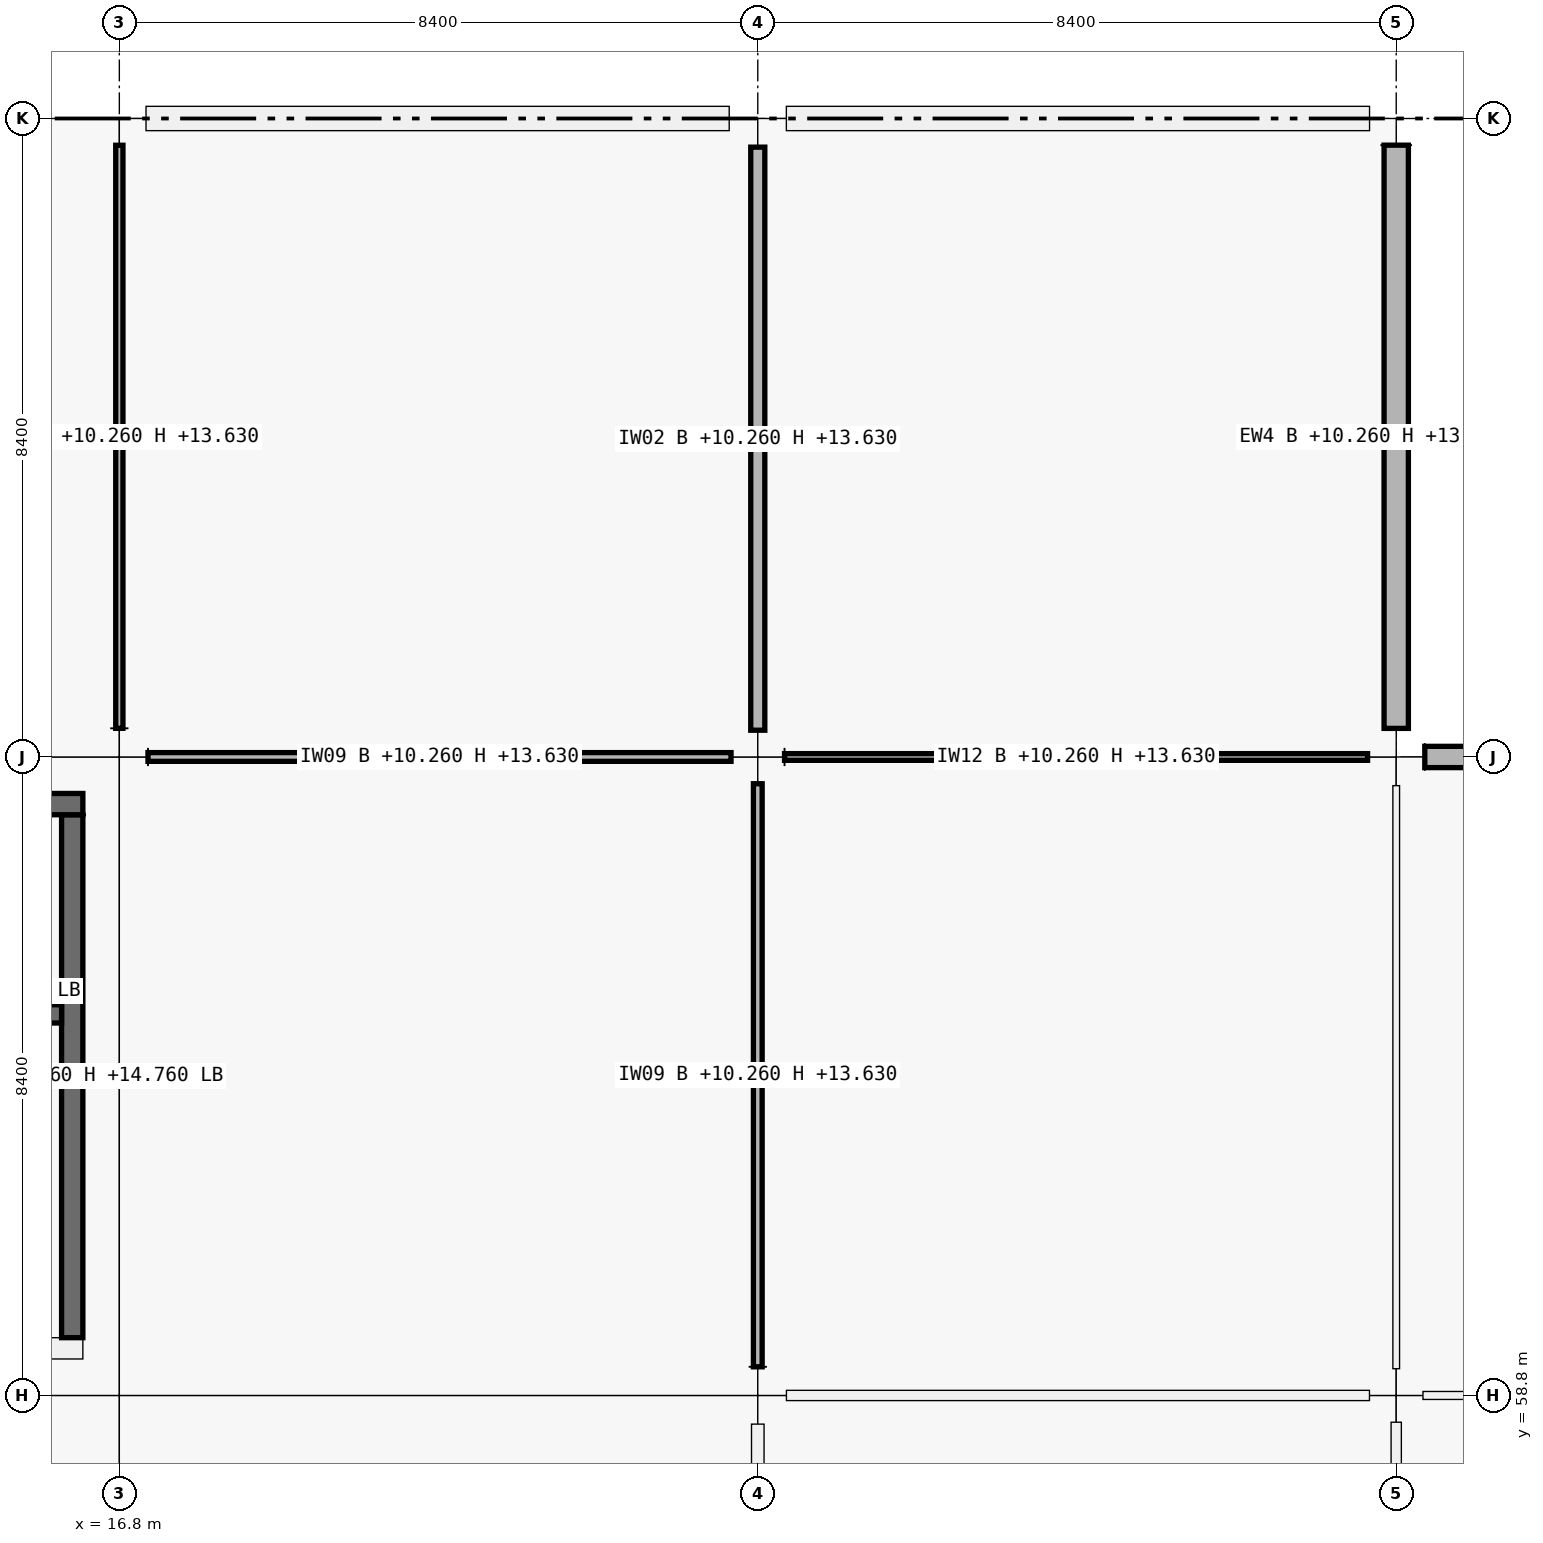
"""IFC4 building model, lengths in metres.
Left out: names, types, materials, properties, quantities, classifications, styles, units other than length and angle.
Written with IfcOpenShell. Run it as: python <this file> out.ifc"""

import sys

from ifc_helpers import new_model, si_unit, direction, frame, frame_2d, origin, origin_2d, place, context, subcontext, project, spatial, rectangle, extrude, element, fill, save


model = new_model("IFC4")
c1 = context("Model", 3, precision=1e-05, world=origin(), true_north=direction((0.0, 1.0)))
c2 = subcontext(c1, "Body", "Model", "MODEL_VIEW")
j1 = project(units=[si_unit("LENGTHUNIT", "METRE"), si_unit("PLANEANGLEUNIT", "RADIAN")], contexts=[c1])
p1 = place(None, origin())
s1 = spatial("IfcSite", under=j1, at=p1, CompositionType="ELEMENT")
p2 = place(p1, origin())
s2 = spatial("IfcBuilding", under=s1, at=p2, CompositionType="ELEMENT")
p3 = place(p2, frame((0.0, 0.0, 10.26)))
s3 = spatial("IfcBuildingStorey", under=s2, at=p3, CompositionType="ELEMENT", Elevation=10.26)
p4 = place(p3, frame((16.8, 58.8, 0.0), z_axis=(0.0, 0.0, 1.0), x_axis=(1.0, 0.0, 0.0)))
e1 = element("IfcColumn", 1, at=p4, inside=s3, PredefinedType="COLUMN", context=c2, shape_type="SweptSolid", body=[
    extrude(rectangle(XDim=0.7, YDim=0.7, at=origin_2d()), origin(), (0.0, 0.0, 1.0), 4.5),
])
p5 = place(p3, frame((16.8, 67.2, 0.0), z_axis=(0.0, 0.0, 1.0), x_axis=(1.0, 0.0, 0.0)))
e2 = element("IfcColumn", 2, at=p5, inside=s3, PredefinedType="COLUMN", context=c2, shape_type="SweptSolid", body=[
    extrude(rectangle(XDim=0.75, YDim=0.75, at=origin_2d()), origin(), (0.0, 0.0, 1.0), 4.5),
])
p6 = place(p3, frame((16.8, 75.6, 0.0), z_axis=(0.0, 0.0, 1.0), x_axis=(1.0, 0.0, 0.0)))
e3 = element("IfcColumn", 3, at=p6, inside=s3, PredefinedType="COLUMN", context=c2, shape_type="SweptSolid", body=[
    extrude(rectangle(XDim=0.7, YDim=0.7, at=origin_2d()), origin(), (0.0, 0.0, 1.0), 4.5),
])
p7 = place(p3, frame((25.2, 58.8, 0.0), z_axis=(0.0, 0.0, 1.0), x_axis=(1.0, 0.0, 0.0)))
e4 = element("IfcColumn", 4, at=p7, inside=s3, PredefinedType="COLUMN", context=c2, shape_type="SweptSolid", body=[
    extrude(rectangle(XDim=0.75, YDim=0.75, at=origin_2d()), origin(), (0.0, 0.0, 1.0), 4.5),
])
p8 = place(p3, frame((25.2, 67.2, 0.0), z_axis=(0.0, 0.0, 1.0), x_axis=(1.0, 0.0, 0.0)))
e5 = element("IfcColumn", 5, at=p8, inside=s3, PredefinedType="COLUMN", context=c2, shape_type="SweptSolid", body=[
    extrude(rectangle(XDim=0.7, YDim=0.7, at=origin_2d()), origin(), (0.0, 0.0, 1.0), 4.5),
])
p9 = place(p3, frame((25.2, 75.6, 0.0), z_axis=(0.0, 0.0, 1.0), x_axis=(1.0, 0.0, 0.0)))
e6 = element("IfcColumn", 6, at=p9, inside=s3, PredefinedType="COLUMN", context=c2, shape_type="SweptSolid", body=[
    extrude(rectangle(XDim=0.75, YDim=0.75, at=origin_2d()), origin(), (0.0, 0.0, 1.0), 4.5),
])
p10 = place(p3, frame((33.6, 58.8, 0.0), z_axis=(0.0, 0.0, 1.0), x_axis=(1.0, 0.0, 0.0)))
e7 = element("IfcColumn", 7, at=p10, inside=s3, PredefinedType="COLUMN", context=c2, shape_type="SweptSolid", body=[
    extrude(rectangle(XDim=0.7, YDim=0.7, at=origin_2d()), origin(), (0.0, 0.0, 1.0), 4.5),
])
p11 = place(p3, frame((33.6, 67.2, 0.0), z_axis=(0.0, 0.0, 1.0), x_axis=(1.0, 0.0, 0.0)))
e8 = element("IfcColumn", 8, at=p11, inside=s3, PredefinedType="COLUMN", context=c2, shape_type="SweptSolid", body=[
    extrude(rectangle(XDim=0.75, YDim=0.75, at=origin_2d()), origin(), (0.0, 0.0, 1.0), 4.5),
])
p12 = place(p3, frame((33.6, 75.6, 0.0), z_axis=(0.0, 0.0, 1.0), x_axis=(1.0, 0.0, 0.0)))
e9 = element("IfcColumn", 9, at=p12, inside=s3, PredefinedType="COLUMN", context=c2, shape_type="SweptSolid", body=[
    extrude(rectangle(XDim=0.7, YDim=0.7, at=origin_2d()), origin(), (0.0, 0.0, 1.0), 4.5),
])
p13 = place(p3, frame((17.151, 75.6, 0.0), z_axis=(0.0, 0.0, 1.0), x_axis=(1.0, 0.0, 0.0)))
e10 = element("IfcWall", 10, at=p13, inside=s3, PredefinedType="SOLIDWALL", context=c2, shape_type="SweptSolid", body=[
    extrude(rectangle(XDim=7.673, YDim=0.32, at=frame_2d((3.836, 0.0))), origin(), (0.0, 0.0, 1.0), 3.54),
])
p14 = place(p13, frame((2.636, 0.0, 0.9)))
e11 = element("IfcOpeningElement", 11, at=p14, cuts=e10, PredefinedType="OPENING", context=c2, shape_type="SweptSolid", body=[
    extrude(rectangle(XDim=2.4, YDim=1.8, at=frame_2d((1.2, 0.9))), frame((0.0, 0.16, 0.0), z_axis=(0.0, -1.0, 0.0), x_axis=(1.0, 0.0, 0.0)), (0.0, 0.0, 1.0), 0.32),
])
p15 = place(p3, frame((25.576, 75.6, 0.0), z_axis=(0.0, 0.0, 1.0), x_axis=(1.0, 0.0, 0.0)))
e12 = element("IfcWall", 12, at=p15, inside=s3, PredefinedType="SOLIDWALL", context=c2, shape_type="SweptSolid", body=[
    extrude(rectangle(XDim=7.673, YDim=0.32, at=frame_2d((3.836, 0.0))), origin(), (0.0, 0.0, 1.0), 3.54),
])
p16 = place(p15, frame((2.337, 0.0, 0.9)))
e13 = element("IfcOpeningElement", 13, at=p16, cuts=e12, PredefinedType="OPENING", context=c2, shape_type="SweptSolid", body=[
    extrude(rectangle(XDim=3.0, YDim=1.2, at=frame_2d((1.5, 0.6))), frame((0.0, 0.16, 0.0), z_axis=(0.0, -1.0, 0.0), x_axis=(1.0, 0.0, 0.0)), (0.0, 0.0, 1.0), 0.32),
])
p17 = place(p3, frame((33.6, 75.249, 0.0), z_axis=(0.0, 0.0, 1.0), x_axis=(0.0, -1.0, 0.0)))
e14 = element("IfcWall", 14, at=p17, inside=s3, PredefinedType="SOLIDWALL", context=c2, shape_type="SweptSolid", body=[
    extrude(rectangle(XDim=7.673, YDim=0.32, at=frame_2d((3.836, 0.0))), origin(), (0.0, 0.0, 1.0), 3.54),
])
p18 = place(p17, frame((2.486, 0.0, 0.9)))
e15 = element("IfcOpeningElement", 15, at=p18, cuts=e14, PredefinedType="OPENING", context=c2, shape_type="SweptSolid", body=[
    extrude(rectangle(XDim=2.7, YDim=1.2, at=frame_2d((1.35, 0.6))), frame((0.0, 0.16, 0.0), z_axis=(0.0, -1.0, 0.0), x_axis=(1.0, 0.0, 0.0)), (0.0, 0.0, 1.0), 0.32),
])
p19 = place(p3, frame((33.976, 67.2, 0.0), z_axis=(0.0, 0.0, 1.0), x_axis=(1.0, 0.0, 0.0)))
e16 = element("IfcWall", 16, at=p19, inside=s3, PredefinedType="SOLIDWALL", context=c2, shape_type="SweptSolid", body=[
    extrude(rectangle(XDim=7.673, YDim=0.28, at=frame_2d((3.836, 0.0))), origin(), (0.0, 0.0, 1.0), 3.54),
])
p20 = place(p19, frame((2.937, 0.0, 0.9)))
e17 = element("IfcOpeningElement", 17, at=p20, cuts=e16, PredefinedType="OPENING", context=c2, shape_type="SweptSolid", body=[
    extrude(rectangle(XDim=1.8, YDim=1.35, at=frame_2d((0.9, 0.675))), frame((0.0, 0.14, 0.0), z_axis=(0.0, -1.0, 0.0), x_axis=(1.0, 0.0, 0.0)), (0.0, 0.0, 1.0), 0.28),
])
p21 = place(p3, frame((16.32, 59.42, 0.0), z_axis=(0.0, 0.0, 1.0), x_axis=(-1.0, 0.0, 0.0)))
e18 = element("IfcWall", 18, at=p21, inside=s3, PredefinedType="SHEAR", context=c2, shape_type="SweptSolid", body=[
    extrude(rectangle(XDim=7.44, YDim=0.28, at=frame_2d((3.72, 0.0))), origin(), (0.0, 0.0, 1.0), 4.5),
])
p22 = place(p21, frame((1.28, 0.0, 0.0)))
e19 = element("IfcOpeningElement", 19, at=p22, cuts=e18, PredefinedType="OPENING", context=c2, shape_type="SweptSolid", body=[
    extrude(rectangle(XDim=1.5, YDim=2.15, at=frame_2d((0.75, 1.075))), frame((0.0, 0.14, 0.0), z_axis=(0.0, -1.0, 0.0), x_axis=(1.0, 0.0, 0.0)), (0.0, 0.0, 1.0), 0.28),
])
p23 = place(p3, frame((8.88, 66.58, 0.0), z_axis=(0.0, 0.0, 1.0), x_axis=(1.0, 0.0, 0.0)))
e20 = element("IfcWall", 20, at=p23, inside=s3, PredefinedType="SHEAR", context=c2, shape_type="SweptSolid", body=[
    extrude(rectangle(XDim=7.44, YDim=0.28, at=frame_2d((3.72, 0.0))), origin(), (0.0, 0.0, 1.0), 4.5),
])
p24 = place(p3, frame((16.18, 66.44, 0.0), z_axis=(0.0, 0.0, 1.0), x_axis=(0.0, -1.0, 0.0)))
e21 = element("IfcWall", 21, at=p24, inside=s3, PredefinedType="SHEAR", context=c2, shape_type="SweptSolid", body=[
    extrude(rectangle(XDim=6.88, YDim=0.28, at=frame_2d((3.44, 0.0))), origin(), (0.0, 0.0, 1.0), 4.5),
])
p25 = place(p3, frame((12.56, 63.82, 0.0), z_axis=(0.0, 0.0, 1.0), x_axis=(1.0, 0.0, 0.0)))
e22 = element("IfcWall", 22, at=p25, inside=s3, PredefinedType="SHEAR", context=c2, shape_type="SweptSolid", body=[
    extrude(rectangle(XDim=3.48, YDim=0.24, at=frame_2d((1.74, 0.0))), origin(), (0.0, 0.0, 1.0), 4.5),
])
p26 = place(p25, frame((1.19, 0.0, 0.0)))
e23 = element("IfcOpeningElement", 23, at=p26, cuts=e22, PredefinedType="OPENING", context=c2, shape_type="SweptSolid", body=[
    extrude(rectangle(XDim=1.1, YDim=2.15, at=frame_2d((0.55, 1.075))), frame((0.0, 0.12, 0.0), z_axis=(0.0, -1.0, 0.0), x_axis=(1.0, 0.0, 0.0)), (0.0, 0.0, 1.0), 0.24),
])
p27 = place(p3, frame((17.177, 67.2, 0.0), z_axis=(0.0, 0.0, 1.0), x_axis=(1.0, 0.0, 0.0)))
e24 = element("IfcWall", 24, at=p27, inside=s3, PredefinedType="PARTITIONING", context=c2, shape_type="SweptSolid", body=[
    extrude(rectangle(XDim=7.671, YDim=0.115, at=frame_2d((3.835, 0.0))), origin(), (0.0, 0.0, 1.0), 3.37),
])
p28 = place(p27, frame((3.316, 0.0, 0.0)))
e25 = element("IfcOpeningElement", 25, at=p28, cuts=e24, PredefinedType="OPENING", context=c2, shape_type="SweptSolid", body=[
    extrude(rectangle(XDim=1.04, YDim=2.2, at=frame_2d((0.52, 1.1))), frame((0.0, 0.058, 0.0), z_axis=(0.0, -1.0, 0.0), x_axis=(1.0, 0.0, 0.0)), (0.0, 0.0, 1.0), 0.115),
])
p29 = place(p3, frame((25.577, 58.8, 0.0), z_axis=(0.0, 0.0, 1.0), x_axis=(1.0, 0.0, 0.0)))
e26 = element("IfcWall", 26, at=p29, inside=s3, PredefinedType="PARTITIONING", context=c2, shape_type="SweptSolid", body=[
    extrude(rectangle(XDim=7.671, YDim=0.135, at=frame_2d((3.835, 0.0))), origin(), (0.0, 0.0, 1.0), 3.37),
])
p30 = place(p29, frame((3.306, 0.0, 0.0)))
e27 = element("IfcOpeningElement", 27, at=p30, cuts=e26, PredefinedType="OPENING", context=c2, shape_type="SweptSolid", body=[
    extrude(rectangle(XDim=1.06, YDim=2.25, at=frame_2d((0.53, 1.125))), frame((0.0, 0.067, 0.0), z_axis=(0.0, -1.0, 0.0), x_axis=(1.0, 0.0, 0.0)), (0.0, 0.0, 1.0), 0.135),
])
p31 = place(p3, frame((25.552, 67.2, 0.0), z_axis=(0.0, 0.0, 1.0), x_axis=(1.0, 0.0, 0.0)))
e28 = element("IfcWall", 28, at=p31, inside=s3, PredefinedType="PARTITIONING", context=c2, shape_type="SweptSolid", body=[
    extrude(rectangle(XDim=7.671, YDim=0.088, at=frame_2d((3.835, 0.0))), origin(), (0.0, 0.0, 1.0), 3.37),
])
p32 = place(p31, frame((3.316, 0.0, 0.0)))
e29 = element("IfcOpeningElement", 29, at=p32, cuts=e28, PredefinedType="OPENING", context=c2, shape_type="SweptSolid", body=[
    extrude(rectangle(XDim=1.04, YDim=2.2, at=frame_2d((0.52, 1.1))), frame((0.0, 0.044, 0.0), z_axis=(0.0, -1.0, 0.0), x_axis=(1.0, 0.0, 0.0)), (0.0, 0.0, 1.0), 0.088),
])
p33 = place(p3, frame((33.952, 58.8, 0.0), z_axis=(0.0, 0.0, 1.0), x_axis=(1.0, 0.0, 0.0)))
e30 = element("IfcWall", 30, at=p33, inside=s3, PredefinedType="PARTITIONING", context=c2, shape_type="SweptSolid", body=[
    extrude(rectangle(XDim=7.721, YDim=0.105, at=frame_2d((3.861, 0.0))), origin(), (0.0, 0.0, 1.0), 3.37),
])
p34 = place(p33, frame((3.351, 0.0, 0.0)))
e31 = element("IfcOpeningElement", 31, at=p34, cuts=e30, PredefinedType="OPENING", context=c2, shape_type="SweptSolid", body=[
    extrude(rectangle(XDim=1.02, YDim=2.2, at=frame_2d((0.51, 1.1))), frame((0.0, 0.052, 0.0), z_axis=(0.0, -1.0, 0.0), x_axis=(1.0, 0.0, 0.0)), (0.0, 0.0, 1.0), 0.105),
])
p35 = place(p3, frame((16.8, 67.577, 0.0), z_axis=(0.0, 0.0, 1.0), x_axis=(0.0, 1.0, 0.0)))
e32 = element("IfcWall", 32, at=p35, inside=s3, PredefinedType="PARTITIONING", context=c2, shape_type="SweptSolid", body=[
    extrude(rectangle(XDim=7.671, YDim=0.095, at=frame_2d((3.835, 0.0))), origin(), (0.0, 0.0, 1.0), 3.37),
])
p36 = place(p35, frame((3.311, 0.0, 0.0)))
e33 = element("IfcOpeningElement", 33, at=p36, cuts=e32, PredefinedType="OPENING", context=c2, shape_type="SweptSolid", body=[
    extrude(rectangle(XDim=1.05, YDim=2.12, at=frame_2d((0.525, 1.06))), frame((0.0, 0.047, 0.0), z_axis=(0.0, -1.0, 0.0), x_axis=(1.0, 0.0, 0.0)), (0.0, 0.0, 1.0), 0.095),
])
p37 = place(p3, frame((25.2, 50.752, 0.0), z_axis=(0.0, 0.0, 1.0), x_axis=(0.0, 1.0, 0.0)))
e34 = element("IfcWall", 34, at=p37, inside=s3, PredefinedType="PARTITIONING", context=c2, shape_type="SweptSolid", body=[
    extrude(rectangle(XDim=7.671, YDim=0.165, at=frame_2d((3.835, 0.0))), origin(), (0.0, 0.0, 1.0), 3.37),
])
p38 = place(p37, frame((3.306, 0.0, 0.0)))
e35 = element("IfcOpeningElement", 35, at=p38, cuts=e34, PredefinedType="OPENING", context=c2, shape_type="SweptSolid", body=[
    extrude(rectangle(XDim=1.06, YDim=2.25, at=frame_2d((0.53, 1.125))), frame((0.0, 0.083, 0.0), z_axis=(0.0, -1.0, 0.0), x_axis=(1.0, 0.0, 0.0)), (0.0, 0.0, 1.0), 0.165),
])
p39 = place(p3, frame((25.2, 59.177, 0.0), z_axis=(0.0, 0.0, 1.0), x_axis=(0.0, 1.0, 0.0)))
e36 = element("IfcWall", 36, at=p39, inside=s3, PredefinedType="PARTITIONING", context=c2, shape_type="SweptSolid", body=[
    extrude(rectangle(XDim=7.671, YDim=0.115, at=frame_2d((3.835, 0.0))), origin(), (0.0, 0.0, 1.0), 3.37),
])
p40 = place(p39, frame((3.316, 0.0, 0.0)))
e37 = element("IfcOpeningElement", 37, at=p40, cuts=e36, PredefinedType="OPENING", context=c2, shape_type="SweptSolid", body=[
    extrude(rectangle(XDim=1.04, YDim=2.2, at=frame_2d((0.52, 1.1))), frame((0.0, 0.058, 0.0), z_axis=(0.0, -1.0, 0.0), x_axis=(1.0, 0.0, 0.0)), (0.0, 0.0, 1.0), 0.115),
])
p41 = place(p3, frame((25.2, 67.552, 0.0), z_axis=(0.0, 0.0, 1.0), x_axis=(0.0, 1.0, 0.0)))
e38 = element("IfcWall", 38, at=p41, inside=s3, PredefinedType="PARTITIONING", context=c2, shape_type="SweptSolid", body=[
    extrude(rectangle(XDim=7.671, YDim=0.185, at=frame_2d((3.835, 0.0))), origin(), (0.0, 0.0, 1.0), 3.37),
])
p42 = place(p41, frame((3.356, 0.0, 0.0)))
e39 = element("IfcOpeningElement", 39, at=p42, cuts=e38, PredefinedType="OPENING", context=c2, shape_type="SweptSolid", body=[
    extrude(rectangle(XDim=0.96, YDim=2.18, at=frame_2d((0.48, 1.09))), frame((0.0, 0.093, 0.0), z_axis=(0.0, -1.0, 0.0), x_axis=(1.0, 0.0, 0.0)), (0.0, 0.0, 1.0), 0.185),
])
p43 = place(p3, frame((33.6, 50.777, 0.0), z_axis=(0.0, 0.0, 1.0), x_axis=(0.0, 1.0, 0.0)))
e40 = element("IfcWall", 40, at=p43, inside=s3, PredefinedType="PARTITIONING", context=c2, shape_type="SweptSolid", body=[
    extrude(rectangle(XDim=7.671, YDim=0.135, at=frame_2d((3.835, 0.0))), origin(), (0.0, 0.0, 1.0), 3.37),
])
p44 = place(p43, frame((3.336, 0.0, 0.0)))
e41 = element("IfcOpeningElement", 41, at=p44, cuts=e40, PredefinedType="OPENING", context=c2, shape_type="SweptSolid", body=[
    extrude(rectangle(XDim=1.0, YDim=2.2, at=frame_2d((0.5, 1.1))), frame((0.0, 0.067, 0.0), z_axis=(0.0, -1.0, 0.0), x_axis=(1.0, 0.0, 0.0)), (0.0, 0.0, 1.0), 0.135),
])
p45 = place(p3, frame((33.6, 59.152, 0.0), z_axis=(0.0, 0.0, 1.0), x_axis=(0.0, 1.0, 0.0)))
e42 = element("IfcWall", 42, at=p45, inside=s3, PredefinedType="PARTITIONING", context=c2, shape_type="SweptSolid", body=[
    extrude(rectangle(XDim=7.671, YDim=0.088, at=frame_2d((3.835, 0.0))), origin(), (0.0, 0.0, 1.0), 3.37),
])
p46 = place(p45, frame((3.365, 0.0, 0.0)))
e43 = element("IfcOpeningElement", 43, at=p46, cuts=e42, PredefinedType="OPENING", context=c2, shape_type="SweptSolid", body=[
    extrude(rectangle(XDim=0.94, YDim=2.15, at=frame_2d((0.47, 1.075))), frame((0.0, 0.044, 0.0), z_axis=(0.0, -1.0, 0.0), x_axis=(1.0, 0.0, 0.0)), (0.0, 0.0, 1.0), 0.088),
])
p47 = place(p14, origin())
e44 = element("IfcWindow", 44, at=p47, inside=s3, PartitioningType="SINGLE_PANEL", PredefinedType="WINDOW", context=c2, shape_type="SweptSolid", body=[
    extrude(rectangle(XDim=2.4, YDim=1.8, at=frame_2d((1.2, 0.9))), frame((0.0, 0.03, 0.0), z_axis=(0.0, -1.0, 0.0), x_axis=(1.0, 0.0, 0.0)), (0.0, 0.0, 1.0), 0.06),
])
fill(e11, e44)
p48 = place(p16, origin())
e45 = element("IfcWindow", 45, at=p48, inside=s3, PartitioningType="SINGLE_PANEL", PredefinedType="WINDOW", context=c2, shape_type="SweptSolid", body=[
    extrude(rectangle(XDim=3.0, YDim=1.2, at=frame_2d((1.5, 0.6))), frame((0.0, 0.03, 0.0), z_axis=(0.0, -1.0, 0.0), x_axis=(1.0, 0.0, 0.0)), (0.0, 0.0, 1.0), 0.06),
])
fill(e13, e45)
p49 = place(p18, origin())
e46 = element("IfcWindow", 46, at=p49, inside=s3, PartitioningType="SINGLE_PANEL", PredefinedType="WINDOW", context=c2, shape_type="SweptSolid", body=[
    extrude(rectangle(XDim=2.7, YDim=1.2, at=frame_2d((1.35, 0.6))), frame((0.0, 0.03, 0.0), z_axis=(0.0, -1.0, 0.0), x_axis=(1.0, 0.0, 0.0)), (0.0, 0.0, 1.0), 0.06),
])
fill(e15, e46)
p50 = place(p28, origin())
e47 = element("IfcDoor", 47, at=p50, inside=s3, OperationType="SINGLE_SWING_LEFT", PredefinedType="DOOR", context=c2, shape_type="SweptSolid", body=[
    extrude(rectangle(XDim=1.04, YDim=2.2, at=frame_2d((0.52, 1.1))), frame((0.0, 0.025, 0.0), z_axis=(0.0, -1.0, 0.0), x_axis=(1.0, 0.0, 0.0)), (0.0, 0.0, 1.0), 0.05),
])
fill(e25, e47)
p51 = place(p40, origin())
e48 = element("IfcDoor", 48, at=p51, inside=s3, OperationType="SINGLE_SWING_RIGHT", PredefinedType="DOOR", context=c2, shape_type="SweptSolid", body=[
    extrude(rectangle(XDim=1.04, YDim=2.2, at=frame_2d((0.52, 1.1))), frame((0.0, 0.025, 0.0), z_axis=(0.0, -1.0, 0.0), x_axis=(1.0, 0.0, 0.0)), (0.0, 0.0, 1.0), 0.05),
])
fill(e37, e48)
p52 = place(p32, origin())
e49 = element("IfcDoor", 49, at=p52, inside=s3, OperationType="SINGLE_SWING_RIGHT", PredefinedType="DOOR", context=c2, shape_type="SweptSolid", body=[
    extrude(rectangle(XDim=1.04, YDim=2.2, at=frame_2d((0.52, 1.1))), frame((0.0, 0.025, 0.0), z_axis=(0.0, -1.0, 0.0), x_axis=(1.0, 0.0, 0.0)), (0.0, 0.0, 1.0), 0.05),
])
fill(e29, e49)
p53 = place(p36, origin())
e50 = element("IfcDoor", 50, at=p53, inside=s3, OperationType="SINGLE_SWING_LEFT", PredefinedType="DOOR", context=c2, shape_type="SweptSolid", body=[
    extrude(rectangle(XDim=1.05, YDim=2.12, at=frame_2d((0.525, 1.06))), frame((0.0, 0.025, 0.0), z_axis=(0.0, -1.0, 0.0), x_axis=(1.0, 0.0, 0.0)), (0.0, 0.0, 1.0), 0.05),
])
fill(e33, e50)
p54 = place(p30, origin())
e51 = element("IfcDoor", 51, at=p54, inside=s3, OperationType="SINGLE_SWING_LEFT", PredefinedType="DOOR", context=c2, shape_type="SweptSolid", body=[
    extrude(rectangle(XDim=1.06, YDim=2.25, at=frame_2d((0.53, 1.125))), frame((0.0, 0.025, 0.0), z_axis=(0.0, -1.0, 0.0), x_axis=(1.0, 0.0, 0.0)), (0.0, 0.0, 1.0), 0.05),
])
fill(e27, e51)
p55 = place(p42, origin())
e52 = element("IfcDoor", 52, at=p55, inside=s3, OperationType="SINGLE_SWING_RIGHT", PredefinedType="DOOR", context=c2, shape_type="SweptSolid", body=[
    extrude(rectangle(XDim=0.96, YDim=2.18, at=frame_2d((0.48, 1.09))), frame((0.0, 0.025, 0.0), z_axis=(0.0, -1.0, 0.0), x_axis=(1.0, 0.0, 0.0)), (0.0, 0.0, 1.0), 0.05),
])
fill(e39, e52)
p56 = place(p46, origin())
e53 = element("IfcDoor", 53, at=p56, inside=s3, OperationType="SINGLE_SWING_LEFT", PredefinedType="DOOR", context=c2, shape_type="SweptSolid", body=[
    extrude(rectangle(XDim=0.94, YDim=2.15, at=frame_2d((0.47, 1.075))), frame((0.0, 0.025, 0.0), z_axis=(0.0, -1.0, 0.0), x_axis=(1.0, 0.0, 0.0)), (0.0, 0.0, 1.0), 0.05),
])
fill(e43, e53)
save(model, sys.argv[1])
